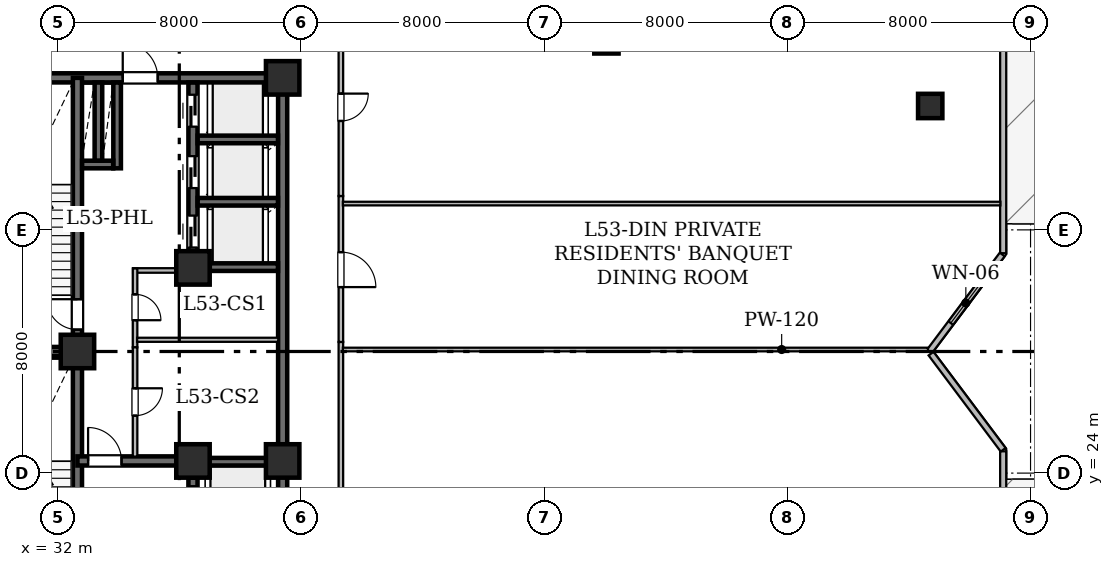
"""IFC4 building model, lengths in metres.
Left out: names, types, materials, properties, quantities, classifications, styles, units other than length and angle.
Written with IfcOpenShell. Run it as: python <this file> out.ifc"""

import sys

from ifc_helpers import new_model, si_unit, direction, frame, frame_2d, origin, origin_2d, place, context, subcontext, project, spatial, rectangle, hollow_rectangle, extrude, element, fill, save


model = new_model("IFC4")
c1 = context("Model", 3, precision=1e-05, world=origin(), true_north=direction((0.0, 1.0)))
c2 = subcontext(c1, "Body", "Model", "MODEL_VIEW")
j1 = project(units=[si_unit("LENGTHUNIT", "METRE"), si_unit("PLANEANGLEUNIT", "RADIAN")], contexts=[c1])
p1 = place(None, origin())
s1 = spatial("IfcSite", under=j1, at=p1, CompositionType="ELEMENT")
p2 = place(p1, origin())
s2 = spatial("IfcBuilding", under=s1, at=p2, CompositionType="ELEMENT")
p3 = place(p2, frame((0.0, 0.0, 207.0)))
s3 = spatial("IfcBuildingStorey", under=s2, at=p3, CompositionType="ELEMENT", Elevation=207.0)
for number, where, z_axis, x_axis in (
    (1, (32.65, 28.0, 0.0), (0.0, 0.0, 1.0), (1.0, 0.0, 0.0)),
    (2, (36.45, 24.4, 0.0), (0.0, 0.0, 1.0), (1.0, 0.0, 0.0)),
    (3, (39.4, 24.4, 0.0), (0.0, 0.0, 1.0), (1.0, 0.0, 0.0)),
    (4, (36.45, 30.75, 0.0), (0.0, 0.0, 1.0), (1.0, 0.0, 0.0)),
    (5, (39.4, 37.0, 0.0), (0.0, 0.0, 1.0), (1.0, 0.0, 0.0)),
):
    element("IfcColumn", number, at=place(p3, frame(where, z_axis=z_axis, x_axis=x_axis)), inside=s3, PredefinedType="COLUMN", context=c2, shape_type="SweptSolid", body=[
        extrude(hollow_rectangle(XDim=1.1, YDim=1.1, WallThickness=0.055, at=origin_2d()), origin(), (0.0, 0.0, 1.0), 4.8),
    ])
for number, where, z_axis, x_axis in (
    (6, (60.7, 36.075, 0.0), (0.0, 0.0, 1.0), (1.0, 0.0, 0.0)),
    (7, (50.05, 38.2, 0.0), (0.0, 0.0, 1.0), (1.0, 0.0, 0.0)),
):
    element("IfcColumn", number, at=place(p3, frame(where, z_axis=z_axis, x_axis=x_axis)), inside=s3, PredefinedType="COLUMN", context=c2, shape_type="SweptSolid", body=[
        extrude(hollow_rectangle(XDim=0.8, YDim=0.8, WallThickness=0.04, at=origin_2d()), origin(), (0.0, 0.0, 1.0), 4.8),
    ])
p4 = place(p3, frame((63.1, 42.496, 0.0), z_axis=(0.0, 0.0, 1.0), x_axis=(0.0, -1.0, 0.0)))
e8 = element("IfcWall", 8, at=p4, inside=s3, PredefinedType="STANDARD", context=c2, shape_type="SweptSolid", body=[
    extrude(rectangle(XDim=11.263, YDim=0.2, at=frame_2d((5.632, 0.0))), origin(), (0.0, 0.0, 1.0), 4.48),
])
p5 = place(p4, frame((1.937, 0.0, 0.0)))
e9 = element("IfcOpeningElement", 9, at=p5, cuts=e8, PredefinedType="OPENING", context=c2, shape_type="SweptSolid", body=[
    extrude(rectangle(XDim=1.1, YDim=2.2, at=frame_2d((0.55, 1.1))), frame((0.0, 0.11, 0.0), z_axis=(0.0, -1.0, 0.0), x_axis=(1.0, 0.0, 0.0)), (0.0, 0.0, 1.0), 0.22),
])
p6 = place(p3, frame((63.069, 31.191, 0.0), z_axis=(0.0, 0.0, 1.0), x_axis=(-0.600137081448, -0.799897170561, 0.0)))
e10 = element("IfcWall", 10, at=p6, inside=s3, PredefinedType="STANDARD", context=c2, shape_type="SweptSolid", body=[
    extrude(rectangle(XDim=3.989, YDim=0.2, at=frame_2d((1.995, 0.0))), origin(), (0.0, 0.0, 1.0), 4.48),
])
p7 = place(p6, frame((1.17, 0.0, 0.85)))
e11 = element("IfcOpeningElement", 11, at=p7, cuts=e10, PredefinedType="OPENING", context=c2, shape_type="SweptSolid", body=[
    extrude(rectangle(XDim=1.65, YDim=1.55, at=frame_2d((0.825, 0.775))), frame((0.0, 0.11, 0.0), z_axis=(0.0, -1.0, 0.0), x_axis=(1.0, 0.0, 0.0)), (0.0, 0.0, 1.0), 0.22),
])
p8 = place(p3, frame((60.727, 27.931, 0.0), z_axis=(0.0, 0.0, 1.0), x_axis=(0.600029630681, -0.799977776132, 0.0)))
e12 = element("IfcWall", 12, at=p8, inside=s3, PredefinedType="STANDARD", context=c2, shape_type="SweptSolid", body=[
    extrude(rectangle(XDim=3.955, YDim=0.2, at=frame_2d((1.978, 0.0))), origin(), (0.0, 0.0, 1.0), 4.48),
])
p9 = place(p3, frame((63.1, 24.717, 0.0), z_axis=(0.0, 0.0, 1.0), x_axis=(0.0, -1.0, 0.0)))
e13 = element("IfcWall", 13, at=p9, inside=s3, PredefinedType="STANDARD", context=c2, shape_type="SweptSolid", body=[
    extrude(rectangle(XDim=11.276, YDim=0.2, at=frame_2d((5.638, 0.0))), origin(), (0.0, 0.0, 1.0), 4.48),
])
p10 = place(p9, frame((1.967, 0.0, 0.0)))
e14 = element("IfcOpeningElement", 14, at=p10, cuts=e13, PredefinedType="OPENING", context=c2, shape_type="SweptSolid", body=[
    extrude(rectangle(XDim=1.1, YDim=2.2, at=frame_2d((0.55, 1.1))), frame((0.0, 0.11, 0.0), z_axis=(0.0, -1.0, 0.0), x_axis=(1.0, 0.0, 0.0)), (0.0, 0.0, 1.0), 0.22),
])
p11 = place(p3, frame((29.0, 37.0, 0.0), z_axis=(0.0, 0.0, 1.0), x_axis=(1.0, 0.0, 0.0)))
e15 = element("IfcWall", 15, at=p11, inside=s3, PredefinedType="SHEAR", context=c2, shape_type="SweptSolid", body=[
    extrude(rectangle(XDim=10.4, YDim=0.3, at=frame_2d((5.2, 0.0))), origin(), (0.0, 0.0, 1.0), 4.48),
])
p12 = place(p11, frame((5.14, 0.0, 0.0)))
e16 = element("IfcOpeningElement", 16, at=p12, cuts=e15, PredefinedType="OPENING", context=c2, shape_type="SweptSolid", body=[
    extrude(rectangle(XDim=1.15, YDim=2.2, at=frame_2d((0.575, 1.1))), frame((0.0, 0.16, 0.0), z_axis=(0.0, -1.0, 0.0), x_axis=(1.0, 0.0, 0.0)), (0.0, 0.0, 1.0), 0.32),
])
p13 = place(p3, frame((39.4, 19.0, 0.0), z_axis=(0.0, 0.0, 1.0), x_axis=(0.0, 1.0, 0.0)))
e17 = element("IfcWall", 17, at=p13, inside=s3, PredefinedType="SHEAR", context=c2, shape_type="SweptSolid", body=[
    extrude(rectangle(XDim=5.4, YDim=0.3, at=frame_2d((2.7, 0.0))), origin(), (0.0, 0.0, 1.0), 4.48),
])
p14 = place(p3, frame((39.4, 24.4, 0.0), z_axis=(0.0, 0.0, 1.0), x_axis=(0.0, 1.0, 0.0)))
e18 = element("IfcWall", 18, at=p14, inside=s3, PredefinedType="SHEAR", context=c2, shape_type="SweptSolid", body=[
    extrude(rectangle(XDim=12.6, YDim=0.3, at=frame_2d((6.3, 0.0))), origin(), (0.0, 0.0, 1.0), 4.48),
])
p15 = place(p3, frame((32.65, 19.0, 0.0), z_axis=(0.0, 0.0, 1.0), x_axis=(0.0, 1.0, 0.0)))
e19 = element("IfcWall", 19, at=p15, inside=s3, PredefinedType="SHEAR", context=c2, shape_type="SweptSolid", body=[
    extrude(rectangle(XDim=9.0, YDim=0.3, at=frame_2d((4.5, 0.0))), origin(), (0.0, 0.0, 1.0), 4.48),
])
p16 = place(p15, frame((0.72, 0.0, 0.0)))
e20 = element("IfcOpeningElement", 20, at=p16, cuts=e19, PredefinedType="OPENING", context=c2, shape_type="SweptSolid", body=[
    extrude(rectangle(XDim=1.0, YDim=2.15, at=frame_2d((0.5, 1.075))), frame((0.0, 0.16, 0.0), z_axis=(0.0, -1.0, 0.0), x_axis=(1.0, 0.0, 0.0)), (0.0, 0.0, 1.0), 0.32),
])
p17 = place(p3, frame((32.65, 28.0, 0.0), z_axis=(0.0, 0.0, 1.0), x_axis=(0.0, 1.0, 0.0)))
e21 = element("IfcWall", 21, at=p17, inside=s3, PredefinedType="SHEAR", context=c2, shape_type="SweptSolid", body=[
    extrude(rectangle(XDim=9.0, YDim=0.3, at=frame_2d((4.5, 0.0))), origin(), (0.0, 0.0, 1.0), 4.48),
])
p18 = place(p17, frame((0.72, 0.0, 0.0)))
e22 = element("IfcOpeningElement", 22, at=p18, cuts=e21, PredefinedType="OPENING", context=c2, shape_type="SweptSolid", body=[
    extrude(rectangle(XDim=1.0, YDim=2.15, at=frame_2d((0.5, 1.075))), frame((0.0, 0.16, 0.0), z_axis=(0.0, -1.0, 0.0), x_axis=(1.0, 0.0, 0.0)), (0.0, 0.0, 1.0), 0.32),
])
p19 = place(p3, frame((29.0, 28.0, 0.0), z_axis=(0.0, 0.0, 1.0), x_axis=(1.0, 0.0, 0.0)))
e23 = element("IfcWall", 23, at=p19, inside=s3, PredefinedType="SHEAR", context=c2, shape_type="SweptSolid", body=[
    extrude(rectangle(XDim=3.65, YDim=0.3, at=frame_2d((1.825, 0.0))), origin(), (0.0, 0.0, 1.0), 4.48),
])
p20 = place(p3, frame((32.65, 24.4, 0.0), z_axis=(0.0, 0.0, 1.0), x_axis=(1.0, 0.0, 0.0)))
e24 = element("IfcWall", 24, at=p20, inside=s3, PredefinedType="SHEAR", context=c2, shape_type="SweptSolid", body=[
    extrude(rectangle(XDim=3.8, YDim=0.3, at=frame_2d((1.9, 0.0))), origin(), (0.0, 0.0, 1.0), 4.48),
])
p21 = place(p20, frame((0.35, 0.0, 0.0)))
e25 = element("IfcOpeningElement", 25, at=p21, cuts=e24, PredefinedType="OPENING", context=c2, shape_type="SweptSolid", body=[
    extrude(rectangle(XDim=1.1, YDim=2.15, at=frame_2d((0.55, 1.075))), frame((0.0, 0.16, 0.0), z_axis=(0.0, -1.0, 0.0), x_axis=(1.0, 0.0, 0.0)), (0.0, 0.0, 1.0), 0.32),
])
p22 = place(p3, frame((36.45, 19.154, 0.0), z_axis=(0.0, 0.0, 1.0), x_axis=(0.0, 1.0, 0.0)))
e26 = element("IfcWall", 26, at=p22, inside=s3, PredefinedType="SHEAR", context=c2, shape_type="SweptSolid", body=[
    extrude(rectangle(XDim=4.696, YDim=0.3, at=frame_2d((2.348, 0.0))), origin(), (0.0, 0.0, 1.0), 4.48),
])
p23 = place(p22, frame((0.696, 0.0, 0.0)))
e27 = element("IfcOpeningElement", 27, at=p23, cuts=e26, PredefinedType="OPENING", context=c2, shape_type="SweptSolid", body=[
    extrude(rectangle(XDim=1.1, YDim=2.15, at=frame_2d((0.55, 1.075))), frame((0.0, 0.16, 0.0), z_axis=(0.0, -1.0, 0.0), x_axis=(1.0, 0.0, 0.0)), (0.0, 0.0, 1.0), 0.32),
])
p24 = place(p22, frame((3.316, 0.0, 0.0)))
e28 = element("IfcOpeningElement", 28, at=p24, cuts=e26, PredefinedType="OPENING", context=c2, shape_type="SweptSolid", body=[
    extrude(rectangle(XDim=1.1, YDim=2.15, at=frame_2d((0.55, 1.075))), frame((0.0, 0.16, 0.0), z_axis=(0.0, -1.0, 0.0), x_axis=(1.0, 0.0, 0.0)), (0.0, 0.0, 1.0), 0.32),
])
p25 = place(p3, frame((36.45, 31.3, 0.0), z_axis=(0.0, 0.0, 1.0), x_axis=(0.0, 1.0, 0.0)))
e29 = element("IfcWall", 29, at=p25, inside=s3, PredefinedType="SHEAR", context=c2, shape_type="SweptSolid", body=[
    extrude(rectangle(XDim=5.546, YDim=0.3, at=frame_2d((2.773, 0.0))), origin(), (0.0, 0.0, 1.0), 4.48),
])
p26 = place(p25, frame((0.12, 0.0, 0.0)))
e30 = element("IfcOpeningElement", 30, at=p26, cuts=e29, PredefinedType="OPENING", context=c2, shape_type="SweptSolid", body=[
    extrude(rectangle(XDim=1.05, YDim=2.15, at=frame_2d((0.525, 1.075))), frame((0.0, 0.16, 0.0), z_axis=(0.0, -1.0, 0.0), x_axis=(1.0, 0.0, 0.0)), (0.0, 0.0, 1.0), 0.32),
])
p27 = place(p25, frame((2.075, 0.0, 0.0)))
e31 = element("IfcOpeningElement", 31, at=p27, cuts=e29, PredefinedType="OPENING", context=c2, shape_type="SweptSolid", body=[
    extrude(rectangle(XDim=1.05, YDim=2.15, at=frame_2d((0.525, 1.075))), frame((0.0, 0.16, 0.0), z_axis=(0.0, -1.0, 0.0), x_axis=(1.0, 0.0, 0.0)), (0.0, 0.0, 1.0), 0.32),
])
p28 = place(p25, frame((4.095, 0.0, 0.0)))
e32 = element("IfcOpeningElement", 32, at=p28, cuts=e29, PredefinedType="OPENING", context=c2, shape_type="SweptSolid", body=[
    extrude(rectangle(XDim=1.05, YDim=2.15, at=frame_2d((0.525, 1.075))), frame((0.0, 0.16, 0.0), z_axis=(0.0, -1.0, 0.0), x_axis=(1.0, 0.0, 0.0)), (0.0, 0.0, 1.0), 0.32),
])
p29 = place(p3, frame((36.604, 24.375, 0.0), z_axis=(0.0, 0.0, 1.0), x_axis=(1.0, 0.0, 0.0)))
e33 = element("IfcWall", 33, at=p29, inside=s3, PredefinedType="SHEAR", context=c2, shape_type="SweptSolid", body=[
    extrude(rectangle(XDim=2.642, YDim=0.25, at=frame_2d((1.321, 0.0))), origin(), (0.0, 0.0, 1.0), 4.48),
])
p30 = place(p3, frame((37.004, 30.775, 0.0), z_axis=(0.0, 0.0, 1.0), x_axis=(1.0, 0.0, 0.0)))
e34 = element("IfcWall", 34, at=p30, inside=s3, PredefinedType="SHEAR", context=c2, shape_type="SweptSolid", body=[
    extrude(rectangle(XDim=2.242, YDim=0.25, at=frame_2d((1.121, 0.0))), origin(), (0.0, 0.0, 1.0), 4.48),
])
for number, where, z_axis, x_axis in (
    (35, (36.604, 32.925, 0.0), (0.0, 0.0, 1.0), (1.0, 0.0, 0.0)),
    (36, (36.604, 34.975, 0.0), (0.0, 0.0, 1.0), (1.0, 0.0, 0.0)),
):
    element("IfcWall", number, at=place(p3, frame(where, z_axis=z_axis, x_axis=x_axis)), inside=s3, PredefinedType="SHEAR", context=c2, shape_type="SweptSolid", body=[
        extrude(rectangle(XDim=2.642, YDim=0.25, at=frame_2d((1.321, 0.0))), origin(), (0.0, 0.0, 1.0), 4.48),
    ])
p31 = place(p3, frame((33.955, 34.025, 0.0), z_axis=(0.0, 0.0, 1.0), x_axis=(0.0, 1.0, 0.0)))
e37 = element("IfcWall", 37, at=p31, inside=s3, PredefinedType="SHEAR", context=c2, shape_type="SweptSolid", body=[
    extrude(rectangle(XDim=2.821, YDim=0.25, at=frame_2d((1.411, 0.0))), origin(), (0.0, 0.0, 1.0), 4.48),
])
p32 = place(p3, frame((32.804, 34.15, 0.0), z_axis=(0.0, 0.0, 1.0), x_axis=(1.0, 0.0, 0.0)))
e38 = element("IfcWall", 38, at=p32, inside=s3, PredefinedType="SHEAR", context=c2, shape_type="SweptSolid", body=[
    extrude(rectangle(XDim=1.022, YDim=0.25, at=frame_2d((0.511, 0.0))), origin(), (0.0, 0.0, 1.0), 4.48),
])
p33 = place(p3, frame((33.34, 34.279, 0.0), z_axis=(0.0, 0.0, 1.0), x_axis=(0.0, 1.0, 0.0)))
e39 = element("IfcWall", 39, at=p33, inside=s3, PredefinedType="SHEAR", context=c2, shape_type="SweptSolid", body=[
    extrude(rectangle(XDim=2.567, YDim=0.25, at=frame_2d((1.283, 0.0))), origin(), (0.0, 0.0, 1.0), 4.48),
])
p34 = place(p3, frame((36.3, 30.665, 0.0), z_axis=(0.0, 0.0, 1.0), x_axis=(-1.0, 0.0, 0.0)))
e40 = element("IfcWall", 40, at=p34, inside=s3, PredefinedType="STANDARD", context=c2, shape_type="SweptSolid", body=[
    extrude(rectangle(XDim=1.82, YDim=0.15, at=frame_2d((0.91, 0.0))), origin(), (0.0, 0.0, 1.0), 4.48),
])
p35 = place(p3, frame((34.545, 30.73, 0.0), z_axis=(0.0, 0.0, 1.0), x_axis=(0.0, -1.0, 0.0)))
e41 = element("IfcWall", 41, at=p35, inside=s3, PredefinedType="STANDARD", context=c2, shape_type="SweptSolid", body=[
    extrude(rectangle(XDim=2.594, YDim=0.15, at=frame_2d((1.297, 0.0))), origin(), (0.0, 0.0, 1.0), 4.48),
])
p36 = place(p35, frame((0.851, 0.0, 0.0)))
e42 = element("IfcOpeningElement", 42, at=p36, cuts=e41, PredefinedType="OPENING", context=c2, shape_type="SweptSolid", body=[
    extrude(rectangle(XDim=0.85, YDim=2.1, at=frame_2d((0.425, 1.05))), frame((0.0, 0.085, 0.0), z_axis=(0.0, -1.0, 0.0), x_axis=(1.0, 0.0, 0.0)), (0.0, 0.0, 1.0), 0.17),
])
p37 = place(p3, frame((34.545, 28.136, 0.0), z_axis=(0.0, 0.0, 1.0), x_axis=(0.0, -1.0, 0.0)))
e43 = element("IfcWall", 43, at=p37, inside=s3, PredefinedType="STANDARD", context=c2, shape_type="SweptSolid", body=[
    extrude(rectangle(XDim=3.592, YDim=0.15, at=frame_2d((1.796, 0.0))), origin(), (0.0, 0.0, 1.0), 4.48),
])
p38 = place(p37, frame((1.346, 0.0, 0.0)))
e44 = element("IfcOpeningElement", 44, at=p38, cuts=e43, PredefinedType="OPENING", context=c2, shape_type="SweptSolid", body=[
    extrude(rectangle(XDim=0.9, YDim=2.1, at=frame_2d((0.45, 1.05))), frame((0.0, 0.085, 0.0), z_axis=(0.0, -1.0, 0.0), x_axis=(1.0, 0.0, 0.0)), (0.0, 0.0, 1.0), 0.17),
])
p39 = place(p3, frame((39.256, 28.385, 0.0), z_axis=(0.0, 0.0, 1.0), x_axis=(-1.0, 0.0, 0.0)))
e45 = element("IfcWall", 45, at=p39, inside=s3, PredefinedType="PARTITIONING", context=c2, shape_type="SweptSolid", body=[
    extrude(rectangle(XDim=4.644, YDim=0.135, at=frame_2d((2.322, 0.0))), origin(), (0.0, 0.0, 1.0), 4.48),
])
p40 = place(p3, frame((41.315, 28.314, 0.0), z_axis=(0.0, 0.0, 1.0), x_axis=(0.0, -1.0, 0.0)))
e46 = element("IfcWall", 46, at=p40, inside=s3, PredefinedType="STANDARD", context=c2, shape_type="SweptSolid", body=[
    extrude(rectangle(XDim=11.264, YDim=0.15, at=frame_2d((5.632, 0.0))), origin(), (0.0, 0.0, 1.0), 3.775),
])
p41 = place(p40, frame((5.203, 0.0, 0.0)))
e47 = element("IfcOpeningElement", 47, at=p41, cuts=e46, PredefinedType="OPENING", context=c2, shape_type="SweptSolid", body=[
    extrude(rectangle(XDim=0.9, YDim=2.1, at=frame_2d((0.45, 1.05))), frame((0.0, 0.085, 0.0), z_axis=(0.0, -1.0, 0.0), x_axis=(1.0, 0.0, 0.0)), (0.0, 0.0, 1.0), 0.17),
])
p42 = place(p3, frame((41.315, 33.114, 0.0), z_axis=(0.0, 0.0, 1.0), x_axis=(0.0, -1.0, 0.0)))
e48 = element("IfcWall", 48, at=p42, inside=s3, PredefinedType="STANDARD", context=c2, shape_type="SweptSolid", body=[
    extrude(rectangle(XDim=4.8, YDim=0.15, at=frame_2d((2.4, 0.0))), origin(), (0.0, 0.0, 1.0), 4.007),
])
p43 = place(p42, frame((1.846, 0.0, 0.0)))
e49 = element("IfcOpeningElement", 49, at=p43, cuts=e48, PredefinedType="OPENING", context=c2, shape_type="SweptSolid", body=[
    extrude(rectangle(XDim=1.15, YDim=2.2, at=frame_2d((0.575, 1.1))), frame((0.0, 0.085, 0.0), z_axis=(0.0, -1.0, 0.0), x_axis=(1.0, 0.0, 0.0)), (0.0, 0.0, 1.0), 0.17),
])
p44 = place(p3, frame((41.315, 38.95, 0.0), z_axis=(0.0, 0.0, 1.0), x_axis=(0.0, -1.0, 0.0)))
e50 = element("IfcWall", 50, at=p44, inside=s3, PredefinedType="STANDARD", context=c2, shape_type="SweptSolid", body=[
    extrude(rectangle(XDim=5.836, YDim=0.15, at=frame_2d((2.918, 0.0))), origin(), (0.0, 0.0, 1.0), 3.775),
])
p45 = place(p44, frame((2.468, 0.0, 0.0)))
e51 = element("IfcOpeningElement", 51, at=p45, cuts=e50, PredefinedType="OPENING", context=c2, shape_type="SweptSolid", body=[
    extrude(rectangle(XDim=0.9, YDim=2.1, at=frame_2d((0.45, 1.05))), frame((0.0, 0.085, 0.0), z_axis=(0.0, -1.0, 0.0), x_axis=(1.0, 0.0, 0.0)), (0.0, 0.0, 1.0), 0.17),
])
p46 = place(p3, frame((41.38, 28.065, 0.0), z_axis=(0.0, 0.0, 1.0), x_axis=(1.0, 0.0, 0.0)))
e52 = element("IfcWall", 52, at=p46, inside=s3, PredefinedType="PARTITIONING", context=c2, shape_type="SweptSolid", body=[
    extrude(rectangle(XDim=19.245, YDim=0.12, at=frame_2d((9.623, 0.0))), origin(), (0.0, 0.0, 1.0), 3.775),
])
p47 = place(p3, frame((41.38, 32.865, 0.0), z_axis=(0.0, 0.0, 1.0), x_axis=(1.0, 0.0, 0.0)))
e53 = element("IfcWall", 53, at=p47, inside=s3, PredefinedType="PARTITIONING", context=c2, shape_type="SweptSolid", body=[
    extrude(rectangle(XDim=21.628, YDim=0.12, at=frame_2d((10.814, 0.0))), origin(), (0.0, 0.0, 1.0), 3.775),
])
p48 = place(p7, origin())
e54 = element("IfcWindow", 54, at=p48, inside=s3, PartitioningType="SINGLE_PANEL", PredefinedType="WINDOW", context=c2, shape_type="SweptSolid", body=[
    extrude(rectangle(XDim=1.65, YDim=1.55, at=frame_2d((0.825, 0.775))), frame((0.0, 0.03, 0.0), z_axis=(0.0, -1.0, 0.0), x_axis=(1.0, 0.0, 0.0)), (0.0, 0.0, 1.0), 0.06),
])
fill(e11, e54)
p49 = place(p18, origin())
e55 = element("IfcDoor", 55, at=p49, inside=s3, OperationType="SINGLE_SWING_RIGHT", PredefinedType="DOOR", context=c2, shape_type="SweptSolid", body=[
    extrude(rectangle(XDim=1.0, YDim=2.15, at=frame_2d((0.5, 1.075))), frame((0.0, 0.025, 0.0), z_axis=(0.0, -1.0, 0.0), x_axis=(1.0, 0.0, 0.0)), (0.0, 0.0, 1.0), 0.05),
])
fill(e22, e55)
p50 = place(p21, origin())
e56 = element("IfcDoor", 56, at=p50, inside=s3, OperationType="SINGLE_SWING_LEFT", PredefinedType="DOOR", context=c2, shape_type="SweptSolid", body=[
    extrude(rectangle(XDim=1.1, YDim=2.15, at=frame_2d((0.55, 1.075))), frame((0.0, 0.025, 0.0), z_axis=(0.0, -1.0, 0.0), x_axis=(1.0, 0.0, 0.0)), (0.0, 0.0, 1.0), 0.05),
])
fill(e25, e56)
p51 = place(p12, origin())
e57 = element("IfcDoor", 57, at=p51, inside=s3, OperationType="SINGLE_SWING_LEFT", PredefinedType="DOOR", context=c2, shape_type="SweptSolid", body=[
    extrude(rectangle(XDim=1.15, YDim=2.2, at=frame_2d((0.575, 1.1))), frame((0.0, 0.025, 0.0), z_axis=(0.0, -1.0, 0.0), x_axis=(1.0, 0.0, 0.0)), (0.0, 0.0, 1.0), 0.05),
])
fill(e16, e57)
p52 = place(p24, origin())
e58 = element("IfcDoor", 58, at=p52, inside=s3, OperationType="SLIDING_TO_LEFT", PredefinedType="DOOR", context=c2, shape_type="SweptSolid", body=[
    extrude(rectangle(XDim=1.1, YDim=2.15, at=frame_2d((0.55, 1.075))), frame((0.0, 0.025, 0.0), z_axis=(0.0, -1.0, 0.0), x_axis=(1.0, 0.0, 0.0)), (0.0, 0.0, 1.0), 0.05),
])
fill(e28, e58)
p53 = place(p26, origin())
e59 = element("IfcDoor", 59, at=p53, inside=s3, OperationType="SLIDING_TO_LEFT", PredefinedType="DOOR", context=c2, shape_type="SweptSolid", body=[
    extrude(rectangle(XDim=1.05, YDim=2.15, at=frame_2d((0.525, 1.075))), frame((0.0, 0.025, 0.0), z_axis=(0.0, -1.0, 0.0), x_axis=(1.0, 0.0, 0.0)), (0.0, 0.0, 1.0), 0.05),
])
fill(e30, e59)
p54 = place(p27, origin())
e60 = element("IfcDoor", 60, at=p54, inside=s3, OperationType="SLIDING_TO_LEFT", PredefinedType="DOOR", context=c2, shape_type="SweptSolid", body=[
    extrude(rectangle(XDim=1.05, YDim=2.15, at=frame_2d((0.525, 1.075))), frame((0.0, 0.025, 0.0), z_axis=(0.0, -1.0, 0.0), x_axis=(1.0, 0.0, 0.0)), (0.0, 0.0, 1.0), 0.05),
])
fill(e31, e60)
p55 = place(p28, origin())
e61 = element("IfcDoor", 61, at=p55, inside=s3, OperationType="SLIDING_TO_LEFT", PredefinedType="DOOR", context=c2, shape_type="SweptSolid", body=[
    extrude(rectangle(XDim=1.05, YDim=2.15, at=frame_2d((0.525, 1.075))), frame((0.0, 0.025, 0.0), z_axis=(0.0, -1.0, 0.0), x_axis=(1.0, 0.0, 0.0)), (0.0, 0.0, 1.0), 0.05),
])
fill(e32, e61)
p56 = place(p36, origin())
e62 = element("IfcDoor", 62, at=p56, inside=s3, OperationType="SINGLE_SWING_RIGHT", PredefinedType="DOOR", context=c2, shape_type="SweptSolid", body=[
    extrude(rectangle(XDim=0.85, YDim=2.1, at=frame_2d((0.425, 1.05))), frame((0.0, 0.025, 0.0), z_axis=(0.0, -1.0, 0.0), x_axis=(1.0, 0.0, 0.0)), (0.0, 0.0, 1.0), 0.05),
])
fill(e42, e62)
p57 = place(p38, origin())
e63 = element("IfcDoor", 63, at=p57, inside=s3, OperationType="SINGLE_SWING_LEFT", PredefinedType="DOOR", context=c2, shape_type="SweptSolid", body=[
    extrude(rectangle(XDim=0.9, YDim=2.1, at=frame_2d((0.45, 1.05))), frame((0.0, 0.025, 0.0), z_axis=(0.0, -1.0, 0.0), x_axis=(1.0, 0.0, 0.0)), (0.0, 0.0, 1.0), 0.05),
])
fill(e44, e63)
p58 = place(p43, origin())
e64 = element("IfcDoor", 64, at=p58, inside=s3, OperationType="SINGLE_SWING_RIGHT", PredefinedType="DOOR", context=c2, shape_type="SweptSolid", body=[
    extrude(rectangle(XDim=1.15, YDim=2.2, at=frame_2d((0.575, 1.1))), frame((0.0, 0.025, 0.0), z_axis=(0.0, -1.0, 0.0), x_axis=(1.0, 0.0, 0.0)), (0.0, 0.0, 1.0), 0.05),
])
fill(e49, e64)
p59 = place(p45, origin())
e65 = element("IfcDoor", 65, at=p59, inside=s3, OperationType="SINGLE_SWING_LEFT", PredefinedType="DOOR", context=c2, shape_type="SweptSolid", body=[
    extrude(rectangle(XDim=0.9, YDim=2.1, at=frame_2d((0.45, 1.05))), frame((0.0, 0.025, 0.0), z_axis=(0.0, -1.0, 0.0), x_axis=(1.0, 0.0, 0.0)), (0.0, 0.0, 1.0), 0.05),
])
fill(e51, e65)
save(model, sys.argv[1])
